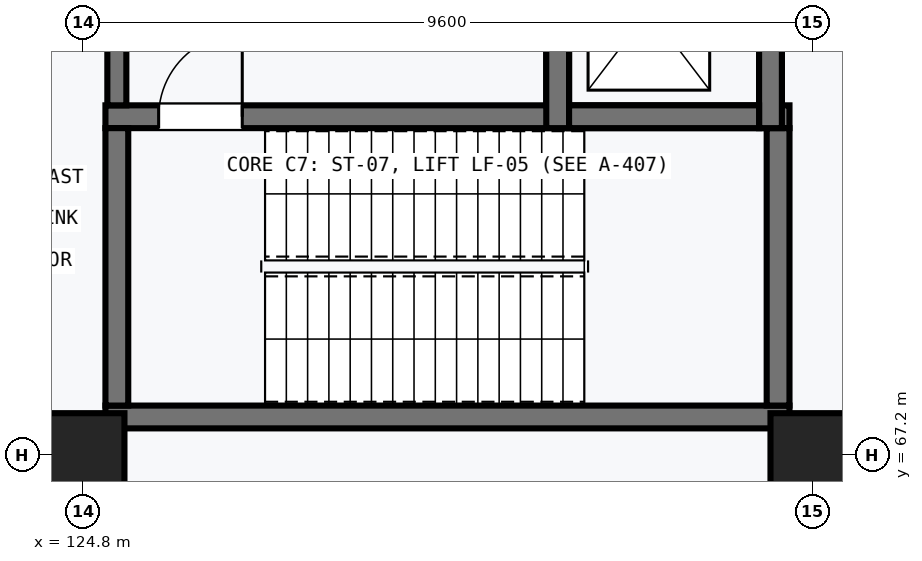
"""IFC4 building model, lengths in metres.
Left out: names, types, materials, properties, quantities, classifications, styles, units other than length and angle.
Written with IfcOpenShell. Run it as: python <this file> out.ifc"""

import sys

from ifc_helpers import new_model, si_unit, direction, frame, frame_2d, origin, origin_2d, place, context, subcontext, project, spatial, rectangle, extrude, element, fill, save


model = new_model("IFC4")
c1 = context("Model", 3, precision=1e-05, world=origin(), true_north=direction((0.0, 1.0)))
c2 = subcontext(c1, "Body", "Model", "MODEL_VIEW")
j1 = project(units=[si_unit("LENGTHUNIT", "METRE"), si_unit("PLANEANGLEUNIT", "RADIAN")], contexts=[c1])
p1 = place(None, origin())
s1 = spatial("IfcSite", under=j1, at=p1, CompositionType="ELEMENT")
p2 = place(p1, origin())
s2 = spatial("IfcBuilding", under=s1, at=p2, CompositionType="ELEMENT")
p3 = place(p2, frame((0.0, 0.0, -10.8)))
s3 = spatial("IfcBuildingStorey", under=s2, at=p3, CompositionType="ELEMENT", Elevation=-10.8)
for number, where, z_axis, x_axis in (
    (1, (124.8, 67.2, 0.0), (0.0, 0.0, 1.0), (1.0, 0.0, 0.0)),
    (2, (134.4, 67.2, 0.0), (0.0, 0.0, 1.0), (1.0, 0.0, 0.0)),
):
    element("IfcColumn", number, at=place(p3, frame(where, z_axis=z_axis, x_axis=x_axis)), inside=s3, PredefinedType="COLUMN", context=c2, shape_type="SweptSolid", body=[
        extrude(rectangle(XDim=1.1, YDim=1.1, at=origin_2d()), origin(), (0.0, 0.0, 1.0), 5.05),
    ])
p4 = place(p3, frame((125.1, 67.7, 0.0), z_axis=(0.0, 0.0, 1.0), x_axis=(1.0, 0.0, 0.0)))
e3 = element("IfcWall", 3, at=p4, inside=s3, PredefinedType="SHEAR", context=c2, shape_type="SweptSolid", body=[
    extrude(rectangle(XDim=9.0, YDim=0.3, at=frame_2d((4.5, 0.0))), origin(), (0.0, 0.0, 1.0), 5.05),
])
p5 = place(p3, frame((134.1, 71.65, 0.0), z_axis=(0.0, 0.0, 1.0), x_axis=(-1.0, 0.0, 0.0)))
e4 = element("IfcWall", 4, at=p5, inside=s3, PredefinedType="SHEAR", context=c2, shape_type="SweptSolid", body=[
    extrude(rectangle(XDim=9.0, YDim=0.3, at=frame_2d((4.5, 0.0))), origin(), (0.0, 0.0, 1.0), 5.05),
])
p6 = place(p5, frame((7.2, 0.0, 0.0)))
e5 = element("IfcOpeningElement", 5, at=p6, cuts=e4, PredefinedType="OPENING", context=c2, shape_type="SweptSolid", body=[
    extrude(rectangle(XDim=1.1, YDim=2.15, at=frame_2d((0.55, 1.075))), frame((0.0, 0.16, 0.0), z_axis=(0.0, -1.0, 0.0), x_axis=(1.0, 0.0, 0.0)), (0.0, 0.0, 1.0), 0.32),
])
for number, where, z_axis, x_axis in (
    (6, (125.25, 67.85, 0.0), (0.0, 0.0, 1.0), (0.0, 1.0, 0.0)),
    (7, (133.95, 71.5, 0.0), (0.0, 0.0, 1.0), (0.0, -1.0, 0.0)),
):
    element("IfcWall", number, at=place(p3, frame(where, z_axis=z_axis, x_axis=x_axis)), inside=s3, PredefinedType="SHEAR", context=c2, shape_type="SweptSolid", body=[
        extrude(rectangle(XDim=3.65, YDim=0.3, at=frame_2d((1.825, 0.0))), origin(), (0.0, 0.0, 1.0), 5.05),
    ])
p7 = place(p3, frame((131.05, 74.5, 0.0), z_axis=(0.0, 0.0, 1.0), x_axis=(0.0, -1.0, 0.0)))
e8 = element("IfcWall", 8, at=p7, inside=s3, PredefinedType="SHEAR", context=c2, shape_type="SweptSolid", body=[
    extrude(rectangle(XDim=2.7, YDim=0.3, at=frame_2d((1.35, 0.0))), origin(), (0.0, 0.0, 1.0), 5.05),
])
p8 = place(p7, frame((0.74, 0.0, 0.0)))
e9 = element("IfcOpeningElement", 9, at=p8, cuts=e8, PredefinedType="OPENING", context=c2, shape_type="SweptSolid", body=[
    extrude(rectangle(XDim=1.22, YDim=2.15, at=frame_2d((0.61, 1.075))), frame((0.0, 0.16, 0.0), z_axis=(0.0, -1.0, 0.0), x_axis=(1.0, 0.0, 0.0)), (0.0, 0.0, 1.0), 0.32),
])
p9 = place(p3, frame((133.85, 71.8, 0.0), z_axis=(0.0, 0.0, 1.0), x_axis=(0.0, 1.0, 0.0)))
e10 = element("IfcWall", 10, at=p9, inside=s3, PredefinedType="SHEAR", context=c2, shape_type="SweptSolid", body=[
    extrude(rectangle(XDim=2.7, YDim=0.3, at=frame_2d((1.35, 0.0))), origin(), (0.0, 0.0, 1.0), 5.05),
])
p10 = place(p3, frame((125.25, 71.8, 0.0), z_axis=(0.0, 0.0, 1.0), x_axis=(0.0, 1.0, 0.0)))
e11 = element("IfcWall", 11, at=p10, inside=s3, PredefinedType="SHEAR", context=c2, shape_type="SweptSolid", body=[
    extrude(rectangle(XDim=2.7, YDim=0.25, at=frame_2d((1.35, 0.0))), origin(), (0.0, 0.0, 1.0), 5.05),
])
p11 = place(p10, frame((0.75, 0.0, 0.0)))
e12 = element("IfcOpeningElement", 12, at=p11, cuts=e11, PredefinedType="OPENING", context=c2, shape_type="SweptSolid", body=[
    extrude(rectangle(XDim=1.2, YDim=2.15, at=frame_2d((0.6, 1.075))), frame((0.0, 0.135, 0.0), z_axis=(0.0, -1.0, 0.0), x_axis=(1.0, 0.0, 0.0)), (0.0, 0.0, 1.0), 0.27),
])
for number, where, z_axis, x_axis in (
    (13, (131.05, 71.5, -1.2), (0.0, 0.0, 1.0), (0.0, 1.0, 0.0)),
    (14, (133.85, 71.5, -1.2), (0.0, 0.0, 1.0), (0.0, 1.0, 0.0)),
):
    element("IfcWall", number, at=place(p3, frame(where, z_axis=z_axis, x_axis=x_axis)), inside=s3, PredefinedType="SHEAR", context=c2, shape_type="SweptSolid", body=[
        extrude(rectangle(XDim=3.3, YDim=0.3, at=frame_2d((1.65, 0.0))), origin(), (0.0, 0.0, 1.0), 0.32),
    ])
p12 = place(p3, frame((131.2, 71.65, -1.2), z_axis=(0.0, 0.0, 1.0), x_axis=(1.0, 0.0, 0.0)))
e15 = element("IfcWall", 15, at=p12, inside=s3, PredefinedType="SHEAR", context=c2, shape_type="SweptSolid", body=[
    extrude(rectangle(XDim=2.5, YDim=0.3, at=frame_2d((1.25, 0.0))), origin(), (0.0, 0.0, 1.0), 0.32),
])
p13 = place(p6, frame((1.1, 0.0, 0.0), z_axis=(0.0, 0.0, 1.0), x_axis=(-1.0, 0.0, 0.0)))
e16 = element("IfcDoor", 16, at=p13, inside=s3, OperationType="SINGLE_SWING_LEFT", PredefinedType="DOOR", context=c2, shape_type="SweptSolid", body=[
    extrude(rectangle(XDim=1.1, YDim=2.15, at=frame_2d((0.55, 1.075))), frame((0.0, 0.025, 0.0), z_axis=(0.0, -1.0, 0.0), x_axis=(1.0, 0.0, 0.0)), (0.0, 0.0, 1.0), 0.05),
])
fill(e5, e16)
save(model, sys.argv[1])
